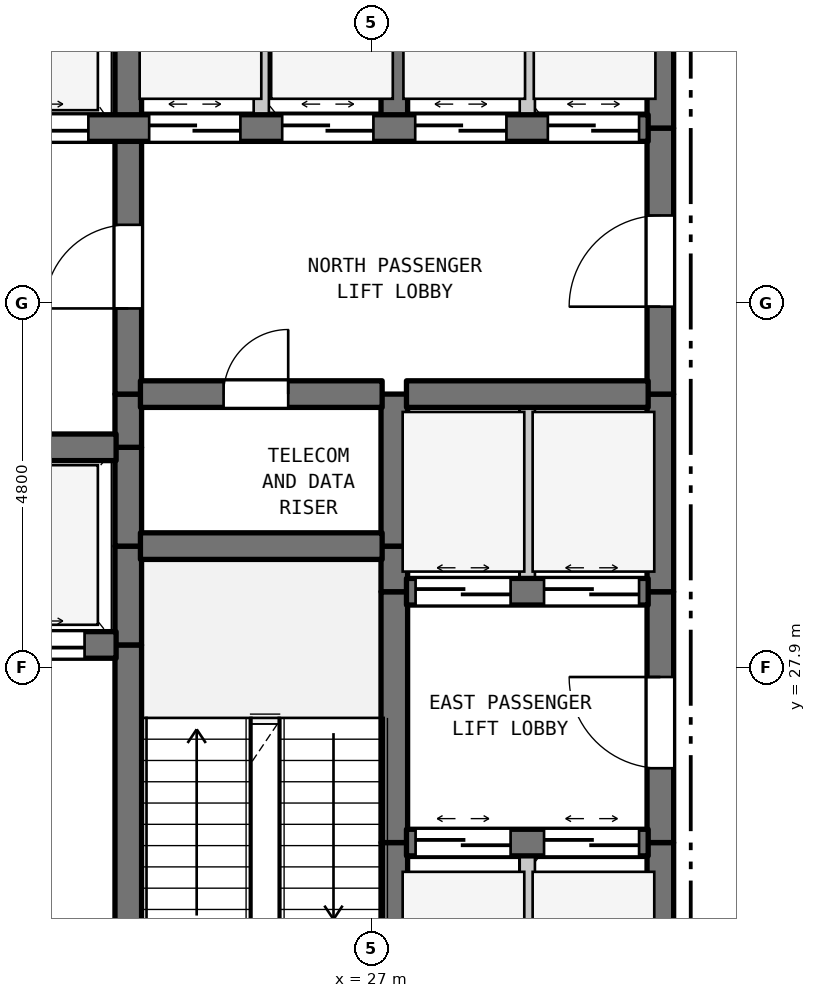
"""IFC4 building model, lengths in metres.
Left out: names, types, materials, properties, quantities, classifications, styles, units other than length and angle.
Written with IfcOpenShell. Run it as: python <this file> out.ifc"""

import sys

from ifc_helpers import new_model, si_unit, direction, frame, frame_2d, origin, place, context, subcontext, project, spatial, rectangle, extrude, element, fill, save


model = new_model("IFC4")
c1 = context("Model", 3, precision=1e-05, world=origin(), true_north=direction((0.0, 1.0)))
c2 = subcontext(c1, "Body", "Model", "MODEL_VIEW")
j1 = project(units=[si_unit("LENGTHUNIT", "METRE"), si_unit("PLANEANGLEUNIT", "RADIAN")], contexts=[c1])
p1 = place(None, origin())
s1 = spatial("IfcSite", under=j1, at=p1, CompositionType="ELEMENT")
p2 = place(p1, origin())
s2 = spatial("IfcBuilding", under=s1, at=p2, CompositionType="ELEMENT")
p3 = place(p2, frame((0.0, 0.0, 35.1)))
s3 = spatial("IfcBuildingStorey", under=s2, at=p3, CompositionType="ELEMENT", Elevation=35.1)
p4 = place(p3, frame((23.8, 22.7, 0.0), z_axis=(0.0, 0.0, 1.0), x_axis=(0.0, 1.0, 0.0)))
e1 = element("IfcWall", 1, at=p4, inside=s3, PredefinedType="SHEAR", context=c2, shape_type="SweptSolid", body=[
    extrude(rectangle(XDim=5.5, YDim=0.35, at=frame_2d((2.75, 0.0))), origin(), (0.0, 0.0, 1.0), 3.385),
])
p5 = place(p4, frame((0.235, 0.0, 0.0)))
e2 = element("IfcOpeningElement", 2, at=p5, cuts=e1, PredefinedType="OPENING", context=c2, shape_type="SweptSolid", body=[
    extrude(rectangle(XDim=1.1, YDim=2.15, at=frame_2d((0.55, 1.075))), frame((0.0, 0.185, 0.0), z_axis=(0.0, -1.0, 0.0), x_axis=(1.0, 0.0, 0.0)), (0.0, 0.0, 1.0), 0.37),
])
for number, where, z_axis, x_axis in (
    (3, (23.8, 28.2, 0.0), (0.0, 0.0, 1.0), (0.0, 1.0, 0.0)),
    (4, (23.8, 29.5, 0.0), (0.0, 0.0, 1.0), (0.0, 1.0, 0.0)),
):
    element("IfcWall", number, at=place(p3, frame(where, z_axis=z_axis, x_axis=x_axis)), inside=s3, PredefinedType="SHEAR", context=c2, shape_type="SweptSolid", body=[
        extrude(rectangle(XDim=1.3, YDim=0.35, at=frame_2d((0.65, 0.0))), origin(), (0.0, 0.0, 1.0), 3.385),
    ])
p6 = place(p3, frame((23.8, 30.8, 0.0), z_axis=(0.0, 0.0, 1.0), x_axis=(0.0, 1.0, 0.0)))
e5 = element("IfcWall", 5, at=p6, inside=s3, PredefinedType="SHEAR", context=c2, shape_type="SweptSolid", body=[
    extrude(rectangle(XDim=0.7, YDim=0.35, at=frame_2d((0.35, 0.0))), origin(), (0.0, 0.0, 1.0), 3.385),
])
p7 = place(p3, frame((23.8, 31.5, 0.0), z_axis=(0.0, 0.0, 1.0), x_axis=(0.0, 1.0, 0.0)))
e6 = element("IfcWall", 6, at=p7, inside=s3, PredefinedType="SHEAR", context=c2, shape_type="SweptSolid", body=[
    extrude(rectangle(XDim=3.5, YDim=0.35, at=frame_2d((1.75, 0.0))), origin(), (0.0, 0.0, 1.0), 3.385),
])
p8 = place(p7, frame((1.127, 0.0, 0.0)))
e7 = element("IfcOpeningElement", 7, at=p8, cuts=e6, PredefinedType="OPENING", context=c2, shape_type="SweptSolid", body=[
    extrude(rectangle(XDim=1.1, YDim=2.15, at=frame_2d((0.55, 1.075))), frame((0.0, 0.185, 0.0), z_axis=(0.0, -1.0, 0.0), x_axis=(1.0, 0.0, 0.0)), (0.0, 0.0, 1.0), 0.37),
])
p9 = place(p3, frame((23.8, 35.0, 0.0), z_axis=(0.0, 0.0, 1.0), x_axis=(0.0, 1.0, 0.0)))
e8 = element("IfcWall", 8, at=p9, inside=s3, PredefinedType="SHEAR", context=c2, shape_type="SweptSolid", body=[
    extrude(rectangle(XDim=2.9, YDim=0.35, at=frame_2d((1.45, 0.0))), origin(), (0.0, 0.0, 1.0), 3.385),
])
p10 = place(p3, frame((25.55, 35.0, 0.0), z_axis=(0.0, 0.0, 1.0), x_axis=(0.0, 1.0, 0.0)))
e9 = element("IfcWall", 9, at=p10, inside=s3, PredefinedType="STANDARD", context=c2, shape_type="SweptSolid", body=[
    extrude(rectangle(XDim=2.9, YDim=0.2, at=frame_2d((1.45, 0.0))), origin(), (0.0, 0.0, 1.0), 3.385),
])
p11 = place(p3, frame((27.3, 22.7, 0.0), z_axis=(0.0, 0.0, 1.0), x_axis=(0.0, 1.0, 0.0)))
e10 = element("IfcWall", 10, at=p11, inside=s3, PredefinedType="SHEAR", context=c2, shape_type="SweptSolid", body=[
    extrude(rectangle(XDim=2.9, YDim=0.35, at=frame_2d((1.45, 0.0))), origin(), (0.0, 0.0, 1.0), 3.385),
])
p12 = place(p3, frame((27.3, 25.6, 0.0), z_axis=(0.0, 0.0, 1.0), x_axis=(0.0, 1.0, 0.0)))
e11 = element("IfcWall", 11, at=p12, inside=s3, PredefinedType="SHEAR", context=c2, shape_type="SweptSolid", body=[
    extrude(rectangle(XDim=3.3, YDim=0.35, at=frame_2d((1.65, 0.0))), origin(), (0.0, 0.0, 1.0), 3.385),
])
p13 = place(p3, frame((27.3, 28.9, 0.0), z_axis=(0.0, 0.0, 1.0), x_axis=(0.0, 1.0, 0.0)))
e12 = element("IfcWall", 12, at=p13, inside=s3, PredefinedType="SHEAR", context=c2, shape_type="SweptSolid", body=[
    extrude(rectangle(XDim=0.6, YDim=0.35, at=frame_2d((0.3, 0.0))), origin(), (0.0, 0.0, 1.0), 3.385),
])
p14 = place(p3, frame((27.3, 29.5, 0.0), z_axis=(0.0, 0.0, 1.0), x_axis=(0.0, 1.0, 0.0)))
e13 = element("IfcWall", 13, at=p14, inside=s3, PredefinedType="SHEAR", context=c2, shape_type="SweptSolid", body=[
    extrude(rectangle(XDim=2.0, YDim=0.35, at=frame_2d((1.0, 0.0))), origin(), (0.0, 0.0, 1.0), 3.385),
])
p15 = place(p3, frame((27.3, 35.0, 0.0), z_axis=(0.0, 0.0, 1.0), x_axis=(0.0, 1.0, 0.0)))
e14 = element("IfcWall", 14, at=p15, inside=s3, PredefinedType="SHEAR", context=c2, shape_type="SweptSolid", body=[
    extrude(rectangle(XDim=2.9, YDim=0.35, at=frame_2d((1.45, 0.0))), origin(), (0.0, 0.0, 1.0), 3.385),
])
p16 = place(p3, frame((29.05, 22.7, 0.0), z_axis=(0.0, 0.0, 1.0), x_axis=(0.0, 1.0, 0.0)))
e15 = element("IfcWall", 15, at=p16, inside=s3, PredefinedType="STANDARD", context=c2, shape_type="SweptSolid", body=[
    extrude(rectangle(XDim=2.9, YDim=0.2, at=frame_2d((1.45, 0.0))), origin(), (0.0, 0.0, 1.0), 3.385),
])
p17 = place(p3, frame((29.05, 28.9, 0.0), z_axis=(0.0, 0.0, 1.0), x_axis=(0.0, 1.0, 0.0)))
e16 = element("IfcWall", 16, at=p17, inside=s3, PredefinedType="STANDARD", context=c2, shape_type="SweptSolid", body=[
    extrude(rectangle(XDim=2.6, YDim=0.2, at=frame_2d((1.3, 0.0))), origin(), (0.0, 0.0, 1.0), 3.385),
])
p18 = place(p3, frame((29.05, 35.0, 0.0), z_axis=(0.0, 0.0, 1.0), x_axis=(0.0, 1.0, 0.0)))
e17 = element("IfcWall", 17, at=p18, inside=s3, PredefinedType="STANDARD", context=c2, shape_type="SweptSolid", body=[
    extrude(rectangle(XDim=2.9, YDim=0.2, at=frame_2d((1.45, 0.0))), origin(), (0.0, 0.0, 1.0), 3.385),
])
p19 = place(p3, frame((30.8, 22.7, 0.0), z_axis=(0.0, 0.0, 1.0), x_axis=(0.0, 1.0, 0.0)))
e18 = element("IfcWall", 18, at=p19, inside=s3, PredefinedType="SHEAR", context=c2, shape_type="SweptSolid", body=[
    extrude(rectangle(XDim=2.9, YDim=0.35, at=frame_2d((1.45, 0.0))), origin(), (0.0, 0.0, 1.0), 3.385),
])
p20 = place(p3, frame((30.8, 25.6, 0.0), z_axis=(0.0, 0.0, 1.0), x_axis=(0.0, 1.0, 0.0)))
e19 = element("IfcWall", 19, at=p20, inside=s3, PredefinedType="SHEAR", context=c2, shape_type="SweptSolid", body=[
    extrude(rectangle(XDim=3.3, YDim=0.35, at=frame_2d((1.65, 0.0))), origin(), (0.0, 0.0, 1.0), 3.385),
])
p21 = place(p20, frame((0.978, 0.0, 0.0)))
e20 = element("IfcOpeningElement", 20, at=p21, cuts=e19, PredefinedType="OPENING", context=c2, shape_type="SweptSolid", body=[
    extrude(rectangle(XDim=1.2, YDim=2.2, at=frame_2d((0.6, 1.1))), frame((0.0, 0.185, 0.0), z_axis=(0.0, -1.0, 0.0), x_axis=(1.0, 0.0, 0.0)), (0.0, 0.0, 1.0), 0.37),
])
p22 = place(p3, frame((30.8, 28.9, 0.0), z_axis=(0.0, 0.0, 1.0), x_axis=(0.0, 1.0, 0.0)))
e21 = element("IfcWall", 21, at=p22, inside=s3, PredefinedType="SHEAR", context=c2, shape_type="SweptSolid", body=[
    extrude(rectangle(XDim=2.6, YDim=0.35, at=frame_2d((1.3, 0.0))), origin(), (0.0, 0.0, 1.0), 3.385),
])
p23 = place(p3, frame((30.8, 31.5, 0.0), z_axis=(0.0, 0.0, 1.0), x_axis=(0.0, 1.0, 0.0)))
e22 = element("IfcWall", 22, at=p23, inside=s3, PredefinedType="SHEAR", context=c2, shape_type="SweptSolid", body=[
    extrude(rectangle(XDim=3.5, YDim=0.35, at=frame_2d((1.75, 0.0))), origin(), (0.0, 0.0, 1.0), 3.385),
])
p24 = place(p23, frame((1.15, 0.0, 0.0)))
e23 = element("IfcOpeningElement", 23, at=p24, cuts=e22, PredefinedType="OPENING", context=c2, shape_type="SweptSolid", body=[
    extrude(rectangle(XDim=1.2, YDim=2.2, at=frame_2d((0.6, 1.1))), frame((0.0, 0.185, 0.0), z_axis=(0.0, -1.0, 0.0), x_axis=(1.0, 0.0, 0.0)), (0.0, 0.0, 1.0), 0.37),
])
p25 = place(p3, frame((30.8, 35.0, 0.0), z_axis=(0.0, 0.0, 1.0), x_axis=(0.0, 1.0, 0.0)))
e24 = element("IfcWall", 24, at=p25, inside=s3, PredefinedType="SHEAR", context=c2, shape_type="SweptSolid", body=[
    extrude(rectangle(XDim=2.9, YDim=0.35, at=frame_2d((1.45, 0.0))), origin(), (0.0, 0.0, 1.0), 3.385),
])
p26 = place(p3, frame((27.46, 25.6, 0.0), z_axis=(0.0, 0.0, 1.0), x_axis=(1.0, 0.0, 0.0)))
e25 = element("IfcWall", 25, at=p26, inside=s3, PredefinedType="SHEAR", context=c2, shape_type="SweptSolid", body=[
    extrude(rectangle(XDim=3.18, YDim=0.35, at=frame_2d((1.59, 0.0))), origin(), (0.0, 0.0, 1.0), 3.385),
])
p27 = place(p26, frame((0.12, 0.0, 0.0)))
e26 = element("IfcOpeningElement", 26, at=p27, cuts=e25, PredefinedType="OPENING", context=c2, shape_type="SweptSolid", body=[
    extrude(rectangle(XDim=1.25, YDim=2.2, at=frame_2d((0.625, 1.1))), frame((0.0, 0.185, 0.0), z_axis=(0.0, -1.0, 0.0), x_axis=(1.0, 0.0, 0.0)), (0.0, 0.0, 1.0), 0.37),
])
p28 = place(p26, frame((1.81, 0.0, 0.0)))
e27 = element("IfcOpeningElement", 27, at=p28, cuts=e25, PredefinedType="OPENING", context=c2, shape_type="SweptSolid", body=[
    extrude(rectangle(XDim=1.25, YDim=2.2, at=frame_2d((0.625, 1.1))), frame((0.0, 0.185, 0.0), z_axis=(0.0, -1.0, 0.0), x_axis=(1.0, 0.0, 0.0)), (0.0, 0.0, 1.0), 0.37),
])
p29 = place(p3, frame((19.16, 28.2, 0.0), z_axis=(0.0, 0.0, 1.0), x_axis=(1.0, 0.0, 0.0)))
e28 = element("IfcWall", 28, at=p29, inside=s3, PredefinedType="SHEAR", context=c2, shape_type="SweptSolid", body=[
    extrude(rectangle(XDim=4.48, YDim=0.35, at=frame_2d((2.24, 0.0))), origin(), (0.0, 0.0, 1.0), 3.385),
])
p30 = place(p29, frame((0.415, 0.0, 0.0)))
e29 = element("IfcOpeningElement", 29, at=p30, cuts=e28, PredefinedType="OPENING", context=c2, shape_type="SweptSolid", body=[
    extrude(rectangle(XDim=1.25, YDim=2.2, at=frame_2d((0.625, 1.1))), frame((0.0, 0.185, 0.0), z_axis=(0.0, -1.0, 0.0), x_axis=(1.0, 0.0, 0.0)), (0.0, 0.0, 1.0), 0.37),
])
p31 = place(p29, frame((2.815, 0.0, 0.0)))
e30 = element("IfcOpeningElement", 30, at=p31, cuts=e28, PredefinedType="OPENING", context=c2, shape_type="SweptSolid", body=[
    extrude(rectangle(XDim=1.25, YDim=2.2, at=frame_2d((0.625, 1.1))), frame((0.0, 0.185, 0.0), z_axis=(0.0, -1.0, 0.0), x_axis=(1.0, 0.0, 0.0)), (0.0, 0.0, 1.0), 0.37),
])
p32 = place(p3, frame((27.46, 28.9, 0.0), z_axis=(0.0, 0.0, 1.0), x_axis=(1.0, 0.0, 0.0)))
e31 = element("IfcWall", 31, at=p32, inside=s3, PredefinedType="SHEAR", context=c2, shape_type="SweptSolid", body=[
    extrude(rectangle(XDim=3.18, YDim=0.35, at=frame_2d((1.59, 0.0))), origin(), (0.0, 0.0, 1.0), 3.385),
])
p33 = place(p32, frame((0.12, 0.0, 0.0)))
e32 = element("IfcOpeningElement", 32, at=p33, cuts=e31, PredefinedType="OPENING", context=c2, shape_type="SweptSolid", body=[
    extrude(rectangle(XDim=1.25, YDim=2.2, at=frame_2d((0.625, 1.1))), frame((0.0, 0.185, 0.0), z_axis=(0.0, -1.0, 0.0), x_axis=(1.0, 0.0, 0.0)), (0.0, 0.0, 1.0), 0.37),
])
p34 = place(p32, frame((1.81, 0.0, 0.0)))
e33 = element("IfcOpeningElement", 33, at=p34, cuts=e31, PredefinedType="OPENING", context=c2, shape_type="SweptSolid", body=[
    extrude(rectangle(XDim=1.25, YDim=2.2, at=frame_2d((0.625, 1.1))), frame((0.0, 0.185, 0.0), z_axis=(0.0, -1.0, 0.0), x_axis=(1.0, 0.0, 0.0)), (0.0, 0.0, 1.0), 0.37),
])
p35 = place(p3, frame((23.96, 29.5, 0.0), z_axis=(0.0, 0.0, 1.0), x_axis=(1.0, 0.0, 0.0)))
e34 = element("IfcWall", 34, at=p35, inside=s3, PredefinedType="SHEAR", context=c2, shape_type="SweptSolid", body=[
    extrude(rectangle(XDim=3.18, YDim=0.35, at=frame_2d((1.59, 0.0))), origin(), (0.0, 0.0, 1.0), 3.385),
])
p36 = place(p3, frame((19.16, 30.8, 0.0), z_axis=(0.0, 0.0, 1.0), x_axis=(1.0, 0.0, 0.0)))
e35 = element("IfcWall", 35, at=p36, inside=s3, PredefinedType="SHEAR", context=c2, shape_type="SweptSolid", body=[
    extrude(rectangle(XDim=4.48, YDim=0.35, at=frame_2d((2.24, 0.0))), origin(), (0.0, 0.0, 1.0), 3.385),
])
p37 = place(p3, frame((23.96, 31.5, 0.0), z_axis=(0.0, 0.0, 1.0), x_axis=(1.0, 0.0, 0.0)))
e36 = element("IfcWall", 36, at=p37, inside=s3, PredefinedType="SHEAR", context=c2, shape_type="SweptSolid", body=[
    extrude(rectangle(XDim=3.18, YDim=0.35, at=frame_2d((1.59, 0.0))), origin(), (0.0, 0.0, 1.0), 3.385),
])
p38 = place(p37, frame((1.094, 0.0, 0.0)))
e37 = element("IfcOpeningElement", 37, at=p38, cuts=e36, PredefinedType="OPENING", context=c2, shape_type="SweptSolid", body=[
    extrude(rectangle(XDim=0.85, YDim=2.1, at=frame_2d((0.425, 1.05))), frame((0.0, 0.185, 0.0), z_axis=(0.0, -1.0, 0.0), x_axis=(1.0, 0.0, 0.0)), (0.0, 0.0, 1.0), 0.37),
])
p39 = place(p3, frame((27.46, 31.5, 0.0), z_axis=(0.0, 0.0, 1.0), x_axis=(1.0, 0.0, 0.0)))
e38 = element("IfcWall", 38, at=p39, inside=s3, PredefinedType="SHEAR", context=c2, shape_type="SweptSolid", body=[
    extrude(rectangle(XDim=3.18, YDim=0.35, at=frame_2d((1.59, 0.0))), origin(), (0.0, 0.0, 1.0), 3.385),
])
p40 = place(p3, frame((19.16, 35.0, 0.0), z_axis=(0.0, 0.0, 1.0), x_axis=(1.0, 0.0, 0.0)))
e39 = element("IfcWall", 39, at=p40, inside=s3, PredefinedType="SHEAR", context=c2, shape_type="SweptSolid", body=[
    extrude(rectangle(XDim=11.48, YDim=0.35, at=frame_2d((5.74, 0.0))), origin(), (0.0, 0.0, 1.0), 3.385),
])
p41 = place(p40, frame((0.365, 0.0, 0.0)))
e40 = element("IfcOpeningElement", 40, at=p41, cuts=e39, PredefinedType="OPENING", context=c2, shape_type="SweptSolid", body=[
    extrude(rectangle(XDim=1.35, YDim=2.2, at=frame_2d((0.675, 1.1))), frame((0.0, 0.185, 0.0), z_axis=(0.0, -1.0, 0.0), x_axis=(1.0, 0.0, 0.0)), (0.0, 0.0, 1.0), 0.37),
])
p42 = place(p40, frame((2.765, 0.0, 0.0)))
e41 = element("IfcOpeningElement", 41, at=p42, cuts=e39, PredefinedType="OPENING", context=c2, shape_type="SweptSolid", body=[
    extrude(rectangle(XDim=1.35, YDim=2.2, at=frame_2d((0.675, 1.1))), frame((0.0, 0.185, 0.0), z_axis=(0.0, -1.0, 0.0), x_axis=(1.0, 0.0, 0.0)), (0.0, 0.0, 1.0), 0.37),
])
p43 = place(p40, frame((4.915, 0.0, 0.0)))
e42 = element("IfcOpeningElement", 42, at=p43, cuts=e39, PredefinedType="OPENING", context=c2, shape_type="SweptSolid", body=[
    extrude(rectangle(XDim=1.2, YDim=2.2, at=frame_2d((0.6, 1.1))), frame((0.0, 0.185, 0.0), z_axis=(0.0, -1.0, 0.0), x_axis=(1.0, 0.0, 0.0)), (0.0, 0.0, 1.0), 0.37),
])
p44 = place(p40, frame((6.665, 0.0, 0.0)))
e43 = element("IfcOpeningElement", 43, at=p44, cuts=e39, PredefinedType="OPENING", context=c2, shape_type="SweptSolid", body=[
    extrude(rectangle(XDim=1.2, YDim=2.2, at=frame_2d((0.6, 1.1))), frame((0.0, 0.185, 0.0), z_axis=(0.0, -1.0, 0.0), x_axis=(1.0, 0.0, 0.0)), (0.0, 0.0, 1.0), 0.37),
])
p45 = place(p40, frame((8.415, 0.0, 0.0)))
e44 = element("IfcOpeningElement", 44, at=p45, cuts=e39, PredefinedType="OPENING", context=c2, shape_type="SweptSolid", body=[
    extrude(rectangle(XDim=1.2, YDim=2.2, at=frame_2d((0.6, 1.1))), frame((0.0, 0.185, 0.0), z_axis=(0.0, -1.0, 0.0), x_axis=(1.0, 0.0, 0.0)), (0.0, 0.0, 1.0), 0.37),
])
p46 = place(p40, frame((10.16, 0.0, 0.0)))
e45 = element("IfcOpeningElement", 45, at=p46, cuts=e39, PredefinedType="OPENING", context=c2, shape_type="SweptSolid", body=[
    extrude(rectangle(XDim=1.2, YDim=2.2, at=frame_2d((0.6, 1.1))), frame((0.0, 0.185, 0.0), z_axis=(0.0, -1.0, 0.0), x_axis=(1.0, 0.0, 0.0)), (0.0, 0.0, 1.0), 0.37),
])
p47 = place(p8, origin())
e46 = element("IfcDoor", 46, at=p47, inside=s3, OperationType="SINGLE_SWING_LEFT", PredefinedType="DOOR", context=c2, shape_type="SweptSolid", body=[
    extrude(rectangle(XDim=1.1, YDim=2.15, at=frame_2d((0.55, 1.075))), frame((0.0, 0.025, 0.0), z_axis=(0.0, -1.0, 0.0), x_axis=(1.0, 0.0, 0.0)), (0.0, 0.0, 1.0), 0.05),
])
fill(e7, e46)
p48 = place(p21, origin())
e47 = element("IfcDoor", 47, at=p48, inside=s3, OperationType="SINGLE_SWING_RIGHT", PredefinedType="DOOR", context=c2, shape_type="SweptSolid", body=[
    extrude(rectangle(XDim=1.2, YDim=2.2, at=frame_2d((0.6, 1.1))), frame((0.0, 0.025, 0.0), z_axis=(0.0, -1.0, 0.0), x_axis=(1.0, 0.0, 0.0)), (0.0, 0.0, 1.0), 0.05),
])
fill(e20, e47)
p49 = place(p24, origin())
e48 = element("IfcDoor", 48, at=p49, inside=s3, OperationType="SINGLE_SWING_LEFT", PredefinedType="DOOR", context=c2, shape_type="SweptSolid", body=[
    extrude(rectangle(XDim=1.2, YDim=2.2, at=frame_2d((0.6, 1.1))), frame((0.0, 0.025, 0.0), z_axis=(0.0, -1.0, 0.0), x_axis=(1.0, 0.0, 0.0)), (0.0, 0.0, 1.0), 0.05),
])
fill(e23, e48)
p50 = place(p27, origin())
e49 = element("IfcDoor", 49, at=p50, inside=s3, OperationType="DOUBLE_DOOR_SLIDING", PredefinedType="DOOR", context=c2, shape_type="SweptSolid", body=[
    extrude(rectangle(XDim=1.25, YDim=2.2, at=frame_2d((0.625, 1.1))), frame((0.0, 0.025, 0.0), z_axis=(0.0, -1.0, 0.0), x_axis=(1.0, 0.0, 0.0)), (0.0, 0.0, 1.0), 0.05),
])
fill(e26, e49)
p51 = place(p28, origin())
e50 = element("IfcDoor", 50, at=p51, inside=s3, OperationType="DOUBLE_DOOR_SLIDING", PredefinedType="DOOR", context=c2, shape_type="SweptSolid", body=[
    extrude(rectangle(XDim=1.25, YDim=2.2, at=frame_2d((0.625, 1.1))), frame((0.0, 0.025, 0.0), z_axis=(0.0, -1.0, 0.0), x_axis=(1.0, 0.0, 0.0)), (0.0, 0.0, 1.0), 0.05),
])
fill(e27, e50)
p52 = place(p31, origin())
e51 = element("IfcDoor", 51, at=p52, inside=s3, OperationType="DOUBLE_DOOR_SLIDING", PredefinedType="DOOR", context=c2, shape_type="SweptSolid", body=[
    extrude(rectangle(XDim=1.25, YDim=2.2, at=frame_2d((0.625, 1.1))), frame((0.0, 0.025, 0.0), z_axis=(0.0, -1.0, 0.0), x_axis=(1.0, 0.0, 0.0)), (0.0, 0.0, 1.0), 0.05),
])
fill(e30, e51)
p53 = place(p33, origin())
e52 = element("IfcDoor", 52, at=p53, inside=s3, OperationType="DOUBLE_DOOR_SLIDING", PredefinedType="DOOR", context=c2, shape_type="SweptSolid", body=[
    extrude(rectangle(XDim=1.25, YDim=2.2, at=frame_2d((0.625, 1.1))), frame((0.0, 0.025, 0.0), z_axis=(0.0, -1.0, 0.0), x_axis=(1.0, 0.0, 0.0)), (0.0, 0.0, 1.0), 0.05),
])
fill(e32, e52)
p54 = place(p34, origin())
e53 = element("IfcDoor", 53, at=p54, inside=s3, OperationType="DOUBLE_DOOR_SLIDING", PredefinedType="DOOR", context=c2, shape_type="SweptSolid", body=[
    extrude(rectangle(XDim=1.25, YDim=2.2, at=frame_2d((0.625, 1.1))), frame((0.0, 0.025, 0.0), z_axis=(0.0, -1.0, 0.0), x_axis=(1.0, 0.0, 0.0)), (0.0, 0.0, 1.0), 0.05),
])
fill(e33, e53)
p55 = place(p38, origin())
e54 = element("IfcDoor", 54, at=p55, inside=s3, OperationType="SINGLE_SWING_RIGHT", PredefinedType="DOOR", context=c2, shape_type="SweptSolid", body=[
    extrude(rectangle(XDim=0.85, YDim=2.1, at=frame_2d((0.425, 1.05))), frame((0.0, 0.025, 0.0), z_axis=(0.0, -1.0, 0.0), x_axis=(1.0, 0.0, 0.0)), (0.0, 0.0, 1.0), 0.05),
])
fill(e37, e54)
p56 = place(p42, origin())
e55 = element("IfcDoor", 55, at=p56, inside=s3, OperationType="DOUBLE_DOOR_SLIDING", PredefinedType="DOOR", context=c2, shape_type="SweptSolid", body=[
    extrude(rectangle(XDim=1.35, YDim=2.2, at=frame_2d((0.675, 1.1))), frame((0.0, 0.025, 0.0), z_axis=(0.0, -1.0, 0.0), x_axis=(1.0, 0.0, 0.0)), (0.0, 0.0, 1.0), 0.05),
])
fill(e41, e55)
p57 = place(p43, origin())
e56 = element("IfcDoor", 56, at=p57, inside=s3, OperationType="DOUBLE_DOOR_SLIDING", PredefinedType="DOOR", context=c2, shape_type="SweptSolid", body=[
    extrude(rectangle(XDim=1.2, YDim=2.2, at=frame_2d((0.6, 1.1))), frame((0.0, 0.025, 0.0), z_axis=(0.0, -1.0, 0.0), x_axis=(1.0, 0.0, 0.0)), (0.0, 0.0, 1.0), 0.05),
])
fill(e42, e56)
p58 = place(p44, origin())
e57 = element("IfcDoor", 57, at=p58, inside=s3, OperationType="DOUBLE_DOOR_SLIDING", PredefinedType="DOOR", context=c2, shape_type="SweptSolid", body=[
    extrude(rectangle(XDim=1.2, YDim=2.2, at=frame_2d((0.6, 1.1))), frame((0.0, 0.025, 0.0), z_axis=(0.0, -1.0, 0.0), x_axis=(1.0, 0.0, 0.0)), (0.0, 0.0, 1.0), 0.05),
])
fill(e43, e57)
p59 = place(p45, origin())
e58 = element("IfcDoor", 58, at=p59, inside=s3, OperationType="DOUBLE_DOOR_SLIDING", PredefinedType="DOOR", context=c2, shape_type="SweptSolid", body=[
    extrude(rectangle(XDim=1.2, YDim=2.2, at=frame_2d((0.6, 1.1))), frame((0.0, 0.025, 0.0), z_axis=(0.0, -1.0, 0.0), x_axis=(1.0, 0.0, 0.0)), (0.0, 0.0, 1.0), 0.05),
])
fill(e44, e58)
p60 = place(p46, origin())
e59 = element("IfcDoor", 59, at=p60, inside=s3, OperationType="DOUBLE_DOOR_SLIDING", PredefinedType="DOOR", context=c2, shape_type="SweptSolid", body=[
    extrude(rectangle(XDim=1.2, YDim=2.2, at=frame_2d((0.6, 1.1))), frame((0.0, 0.025, 0.0), z_axis=(0.0, -1.0, 0.0), x_axis=(1.0, 0.0, 0.0)), (0.0, 0.0, 1.0), 0.05),
])
fill(e45, e59)
save(model, sys.argv[1])
